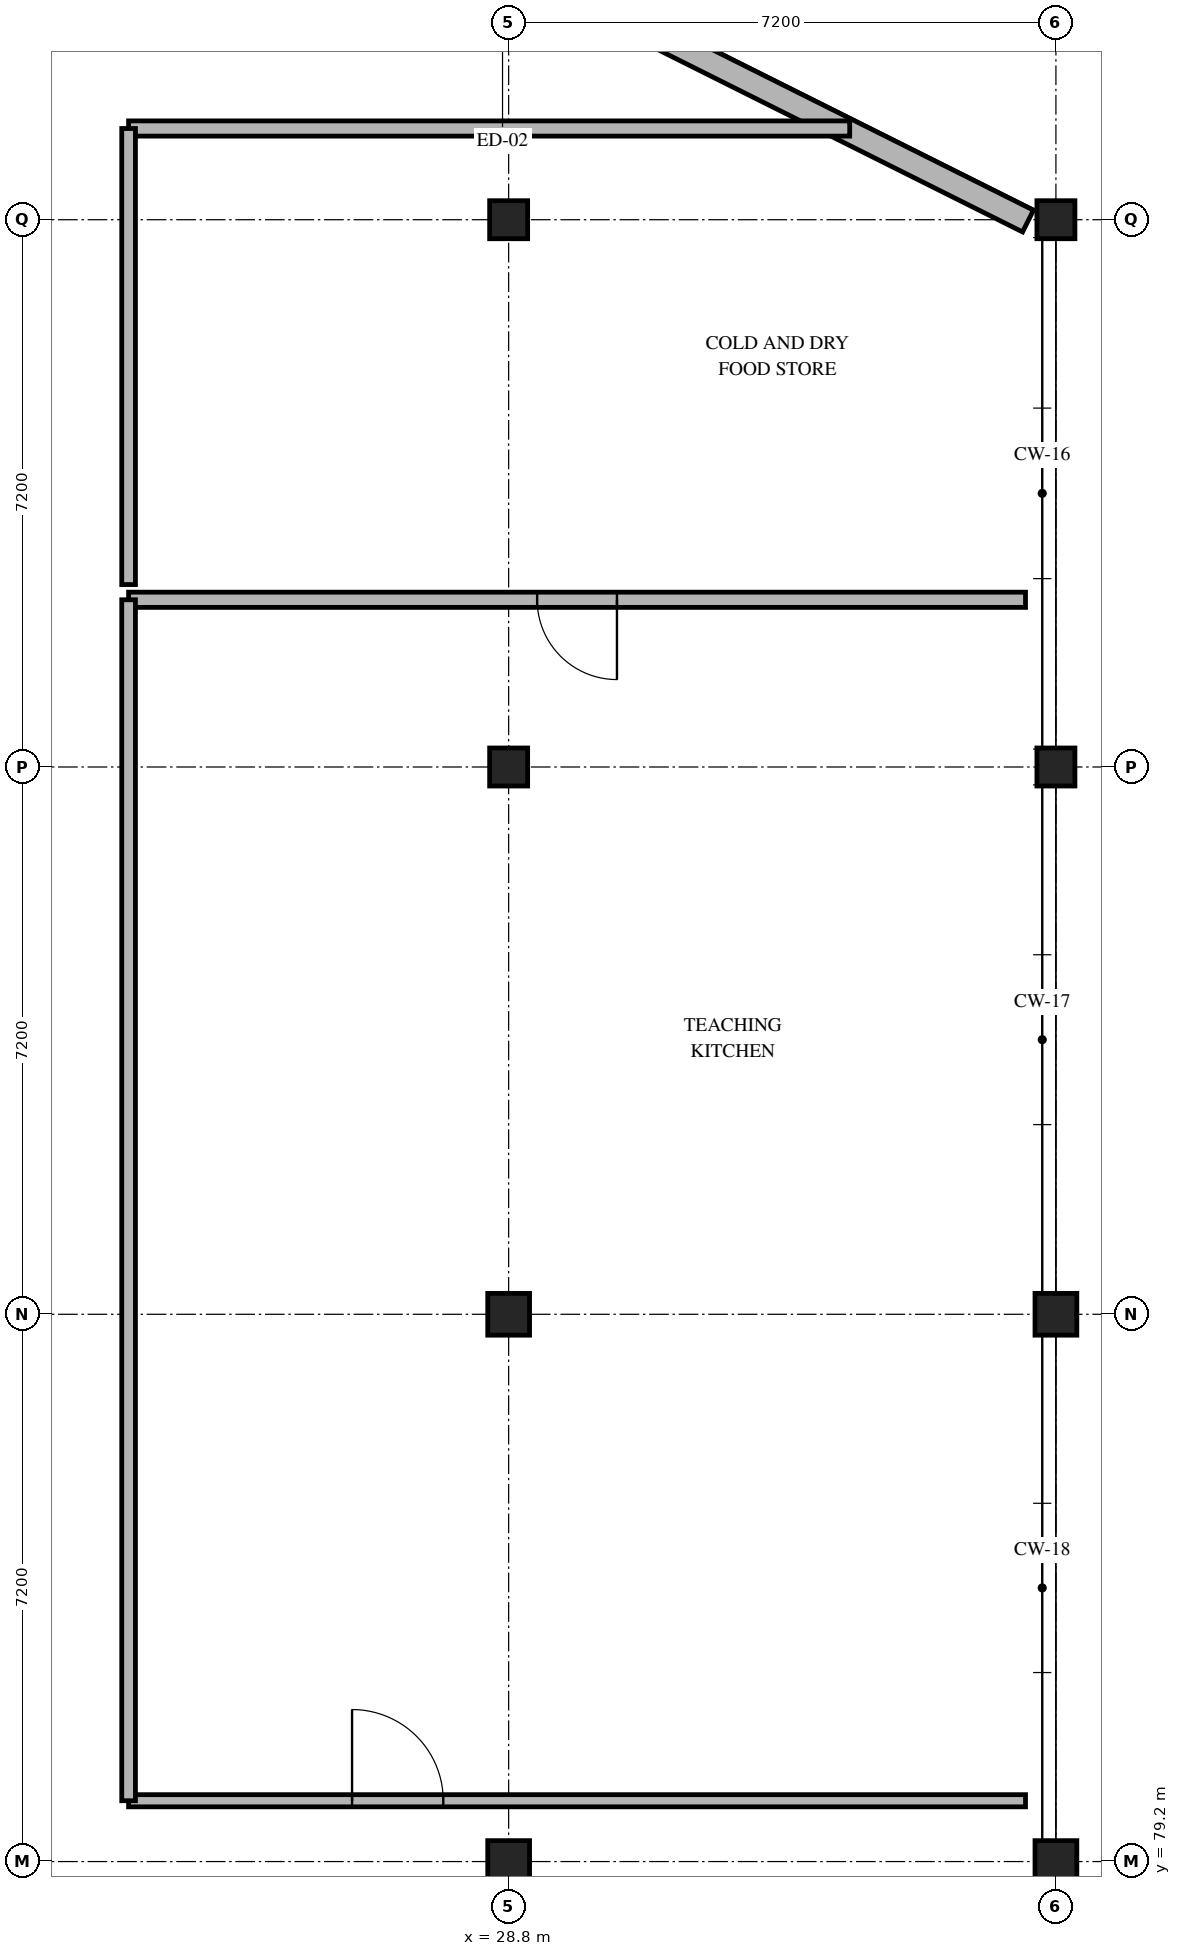
"""IFC4 building model, lengths in metres.
Left out: names, types, materials, properties, quantities, classifications, styles, units other than length and angle.
Written with IfcOpenShell. Run it as: python <this file> out.ifc"""

import sys

from ifc_helpers import new_model, si_unit, direction, frame, frame_2d, origin, origin_2d, place, context, subcontext, project, spatial, rectangle, extrude, element, fill, save


model = new_model("IFC4")
c1 = context("Model", 3, precision=1e-05, world=origin(), true_north=direction((0.0, 1.0)))
c2 = subcontext(c1, "Body", "Model", "MODEL_VIEW")
j1 = project(units=[si_unit("LENGTHUNIT", "METRE"), si_unit("PLANEANGLEUNIT", "RADIAN")], contexts=[c1])
p1 = place(None, origin())
s1 = spatial("IfcSite", under=j1, at=p1, CompositionType="ELEMENT")
p2 = place(p1, origin())
s2 = spatial("IfcBuilding", under=s1, at=p2, CompositionType="ELEMENT")
p3 = place(p2, origin())
s3 = spatial("IfcBuildingStorey", under=s2, at=p3, CompositionType="ELEMENT", Elevation=0.0)
for number, where, z_axis, x_axis in (
    (1, (28.8, 79.2, 0.0), (0.0, 0.0, 1.0), (1.0, 0.0, 0.0)),
    (2, (28.8, 86.4, 0.0), (0.0, 0.0, 1.0), (1.0, 0.0, 0.0)),
):
    element("IfcColumn", number, at=place(p3, frame(where, z_axis=z_axis, x_axis=x_axis)), inside=s3, PredefinedType="COLUMN", context=c2, shape_type="SweptSolid", body=[
        extrude(rectangle(XDim=0.55, YDim=0.55, at=origin_2d()), origin(), (0.0, 0.0, 1.0), 4.5),
    ])
for number, where, z_axis, x_axis in (
    (3, (28.8, 93.6, 0.0), (0.0, 0.0, 1.0), (1.0, 0.0, 0.0)),
    (4, (28.8, 100.8, 0.0), (0.0, 0.0, 1.0), (1.0, 0.0, 0.0)),
):
    element("IfcColumn", number, at=place(p3, frame(where, z_axis=z_axis, x_axis=x_axis)), inside=s3, PredefinedType="COLUMN", context=c2, shape_type="SweptSolid", body=[
        extrude(rectangle(XDim=0.5, YDim=0.5, at=origin_2d()), origin(), (0.0, 0.0, 1.0), 4.5),
    ])
for number, where, z_axis, x_axis in (
    (5, (36.0, 79.2, 0.0), (0.0, 0.0, 1.0), (1.0, 0.0, 0.0)),
    (6, (36.0, 86.4, 0.0), (0.0, 0.0, 1.0), (1.0, 0.0, 0.0)),
):
    element("IfcColumn", number, at=place(p3, frame(where, z_axis=z_axis, x_axis=x_axis)), inside=s3, PredefinedType="COLUMN", context=c2, shape_type="SweptSolid", body=[
        extrude(rectangle(XDim=0.55, YDim=0.55, at=origin_2d()), origin(), (0.0, 0.0, 1.0), 4.5),
    ])
for number, where, z_axis, x_axis in (
    (7, (36.0, 93.6, 0.0), (0.0, 0.0, 1.0), (1.0, 0.0, 0.0)),
    (8, (36.0, 100.8, 0.0), (0.0, 0.0, 1.0), (1.0, 0.0, 0.0)),
):
    element("IfcColumn", number, at=place(p3, frame(where, z_axis=z_axis, x_axis=x_axis)), inside=s3, PredefinedType="COLUMN", context=c2, shape_type="SweptSolid", body=[
        extrude(rectangle(XDim=0.5, YDim=0.5, at=origin_2d()), origin(), (0.0, 0.0, 1.0), 4.5),
    ])
p4 = place(p3, frame((21.806, 107.696, 0.0), z_axis=(0.0, 0.0, 1.0), x_axis=(0.89442087371, -0.447226229857, 0.0)))
e9 = element("IfcWall", 9, at=p4, inside=s3, PredefinedType="SOLIDWALL", context=c2, shape_type="SweptSolid", body=[
    extrude(rectangle(XDim=15.459, YDim=0.32, at=frame_2d((7.729, 0.0))), origin(), (0.0, 0.0, 1.0), 4.24),
])
p5 = place(p4, frame((6.729, 0.0, 0.0)))
e10 = element("IfcOpeningElement", 10, at=p5, cuts=e9, PredefinedType="OPENING", context=c2, shape_type="SweptSolid", body=[
    extrude(rectangle(XDim=2.0, YDim=2.4, at=frame_2d((1.0, 1.2))), frame((0.0, 0.17, 0.0), z_axis=(0.0, -1.0, 0.0), x_axis=(1.0, 0.0, 0.0)), (0.0, 0.0, 1.0), 0.34),
])
p6 = place(p3, frame((23.8, 80.0, 0.0), z_axis=(0.0, 0.0, 1.0), x_axis=(1.0, 0.0, 0.0)))
e11 = element("IfcWall", 11, at=p6, inside=s3, PredefinedType="PARTITIONING", context=c2, shape_type="SweptSolid", body=[
    extrude(rectangle(XDim=11.8, YDim=0.16, at=frame_2d((5.9, 0.0))), origin(), (0.0, 0.0, 1.0), 3.59),
])
p7 = place(p6, frame((2.94, 0.0, 0.0)))
e12 = element("IfcOpeningElement", 12, at=p7, cuts=e11, PredefinedType="OPENING", context=c2, shape_type="SweptSolid", body=[
    extrude(rectangle(XDim=1.2, YDim=2.2, at=frame_2d((0.6, 1.1))), frame((0.0, 0.09, 0.0), z_axis=(0.0, -1.0, 0.0), x_axis=(1.0, 0.0, 0.0)), (0.0, 0.0, 1.0), 0.18),
])
p8 = place(p3, frame((35.6, 95.8, 0.0), z_axis=(0.0, 0.0, 1.0), x_axis=(-1.0, 0.0, 0.0)))
e13 = element("IfcWall", 13, at=p8, inside=s3, PredefinedType="PARTITIONING", context=c2, shape_type="SweptSolid", body=[
    extrude(rectangle(XDim=11.8, YDim=0.2, at=frame_2d((5.9, 0.0))), origin(), (0.0, 0.0, 1.0), 4.24),
])
p9 = place(p8, frame((5.375, 0.0, 0.0)))
e14 = element("IfcOpeningElement", 14, at=p9, cuts=e13, PredefinedType="OPENING", context=c2, shape_type="SweptSolid", body=[
    extrude(rectangle(XDim=1.05, YDim=2.15, at=frame_2d((0.525, 1.075))), frame((0.0, 0.11, 0.0), z_axis=(0.0, -1.0, 0.0), x_axis=(1.0, 0.0, 0.0)), (0.0, 0.0, 1.0), 0.22),
])
p10 = place(p3, frame((23.8, 95.8, 0.0), z_axis=(0.0, 0.0, 1.0), x_axis=(0.0, -1.0, 0.0)))
e15 = element("IfcWall", 15, at=p10, inside=s3, PredefinedType="PARTITIONING", context=c2, shape_type="SweptSolid", body=[
    extrude(rectangle(XDim=15.8, YDim=0.18, at=frame_2d((7.9, 0.0))), origin(), (0.0, 0.0, 1.0), 3.54),
])
p11 = place(p3, frame((33.287, 102.0, 0.0), z_axis=(0.0, 0.0, 1.0), x_axis=(-1.0, 0.0, 0.0)))
e16 = element("IfcWall", 16, at=p11, inside=s3, PredefinedType="PARTITIONING", context=c2, shape_type="SweptSolid", body=[
    extrude(rectangle(XDim=9.487, YDim=0.2, at=frame_2d((4.744, 0.0))), origin(), (0.0, 0.0, 1.0), 4.24),
])
p12 = place(p3, frame((23.8, 102.0, 0.0), z_axis=(0.0, 0.0, 1.0), x_axis=(0.0, -1.0, 0.0)))
e17 = element("IfcWall", 17, at=p12, inside=s3, PredefinedType="PARTITIONING", context=c2, shape_type="SweptSolid", body=[
    extrude(rectangle(XDim=6.0, YDim=0.18, at=frame_2d((3.0, 0.0))), origin(), (0.0, 0.0, 1.0), 4.24),
])
p13 = place(p7, origin())
e18 = element("IfcDoor", 18, at=p13, inside=s3, OperationType="SINGLE_SWING_LEFT", PredefinedType="DOOR", context=c2, shape_type="SweptSolid", body=[
    extrude(rectangle(XDim=1.2, YDim=2.2, at=frame_2d((0.6, 1.1))), frame((0.0, 0.025, 0.0), z_axis=(0.0, -1.0, 0.0), x_axis=(1.0, 0.0, 0.0)), (0.0, 0.0, 1.0), 0.05),
])
fill(e12, e18)
p14 = place(p9, origin())
e19 = element("IfcDoor", 19, at=p14, inside=s3, OperationType="SINGLE_SWING_LEFT", PredefinedType="DOOR", context=c2, shape_type="SweptSolid", body=[
    extrude(rectangle(XDim=1.05, YDim=2.15, at=frame_2d((0.525, 1.075))), frame((0.0, 0.025, 0.0), z_axis=(0.0, -1.0, 0.0), x_axis=(1.0, 0.0, 0.0)), (0.0, 0.0, 1.0), 0.05),
])
fill(e14, e19)
save(model, sys.argv[1])
